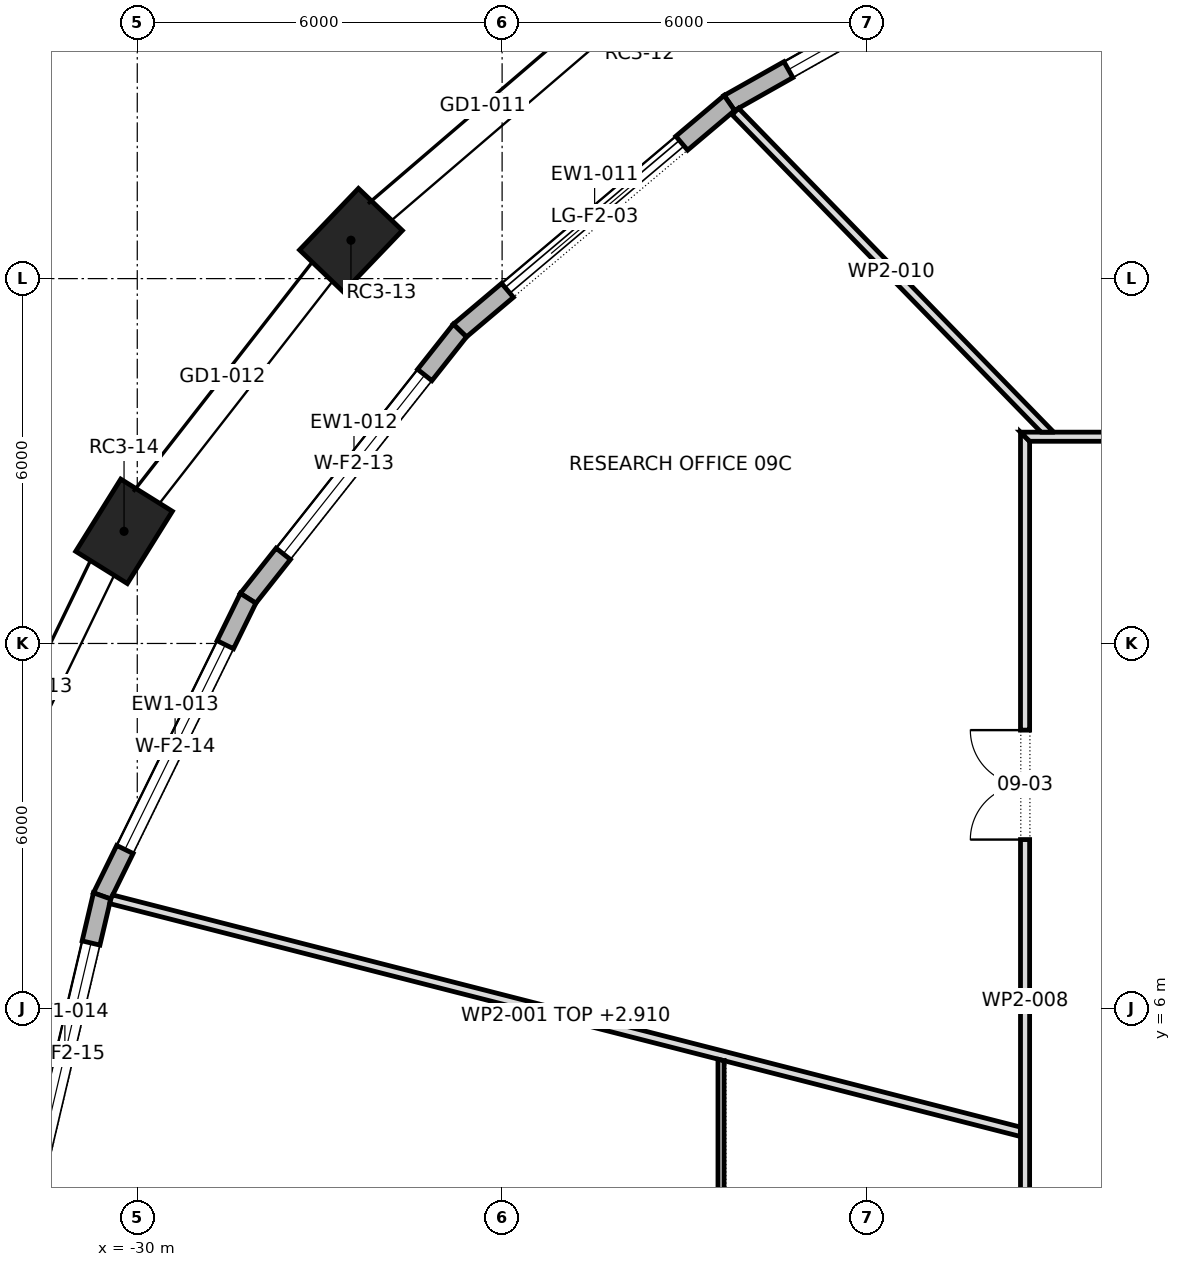
"""IFC4 building model, lengths in metres.
Left out: names, types, materials, properties, quantities, classifications, styles, units other than length and angle.
Written with IfcOpenShell. Run it as: python <this file> out.ifc"""

import sys

from ifc_helpers import new_model, si_unit, direction, frame, frame_2d, origin, origin_2d, place, context, subcontext, project, spatial, polyline, rectangle, outline, extrude, element, fill, save


model = new_model("IFC4")
c1 = context("Model", 3, precision=1e-05, world=origin(), true_north=direction((0.0, 1.0)))
c2 = subcontext(c1, "Body", "Model", "MODEL_VIEW")
j1 = project(units=[si_unit("LENGTHUNIT", "METRE"), si_unit("PLANEANGLEUNIT", "RADIAN")], contexts=[c1])
p1 = place(None, origin())
s1 = spatial("IfcSite", under=j1, at=p1, CompositionType="ELEMENT")
p2 = place(p1, origin())
s2 = spatial("IfcBuilding", under=s1, at=p2, CompositionType="ELEMENT")
p3 = place(p2, frame((0.0, 0.0, 138.1)))
s3 = spatial("IfcBuildingStorey", under=s2, at=p3, CompositionType="ELEMENT", Elevation=138.1)
for number, where, z_axis, x_axis in (
    (1, (-26.486, 18.631, 0.0), (0.0, 0.0, 1.0), (-0.692, -0.722, 0.0)),
    (2, (-30.217, 13.844, 0.0), (0.0, 0.0, 1.0), (-0.529, -0.849, 0.0)),
):
    element("IfcColumn", number, at=place(p3, frame(where, z_axis=z_axis, x_axis=x_axis)), inside=s3, PredefinedType="COLUMN", context=c2, shape_type="SweptSolid", body=[
        extrude(rectangle(XDim=1.4, YDim=1.0, at=origin_2d()), origin(), (0.0, 0.0, 1.0), 4.2),
    ])
p4 = place(p3, frame((-15.055, 23.827, 0.0), z_axis=(0.0, 0.0, 1.0), x_axis=(-0.87090857883, -0.491445060327, 0.0)))
e3 = element("IfcWall", 3, at=p4, inside=s3, PredefinedType="STANDARD", context=c2, shape_type="SweptSolid", body=[
    extrude(outline(polyline([(-0.013, -0.15), (5.994, -0.15), (5.966, 0.15), (0.013, 0.15), (-0.013, -0.15)])), origin(), (0.0, 0.0, 1.0), 3.9),
])
p5 = place(p4, frame((1.115, 0.0, 0.6)))
e4 = element("IfcOpeningElement", 4, at=p5, cuts=e3, PredefinedType="OPENING", context=c2, shape_type="SweptSolid", body=[
    extrude(rectangle(XDim=3.75, YDim=2.85, at=frame_2d((1.875, 1.425))), frame((0.0, 0.162, 0.0), z_axis=(0.0, -1.0, 0.0), x_axis=(1.0, 0.0, 0.0)), (0.0, 0.0, 1.0), 0.324),
])
p6 = place(p3, frame((-20.263, 20.888, 0.0), z_axis=(0.0, 0.0, 1.0), x_axis=(-0.763963973896, -0.645258898884, 0.0)))
e5 = element("IfcWall", 5, at=p6, inside=s3, PredefinedType="STANDARD", context=c2, shape_type="SweptSolid", body=[
    extrude(outline(polyline([(-0.014, -0.15), (5.815, -0.15), (5.785, 0.15), (0.014, 0.15), (-0.014, -0.15)])), origin(), (0.0, 0.0, 1.0), 3.9),
])
p7 = place(p6, frame((1.025, 0.0, 0.0)))
e6 = element("IfcOpeningElement", 6, at=p7, cuts=e5, PredefinedType="OPENING", context=c2, shape_type="SweptSolid", body=[
    extrude(rectangle(XDim=3.75, YDim=3.45, at=frame_2d((1.875, 1.725))), frame((0.0, 0.162, 0.0), z_axis=(0.0, -1.0, 0.0), x_axis=(1.0, 0.0, 0.0)), (0.0, 0.0, 1.0), 0.324),
])
p8 = place(p3, frame((-24.694, 17.146, 0.0), z_axis=(0.0, 0.0, 1.0), x_axis=(-0.620464552431, -0.784234492468, 0.0)))
e7 = element("IfcWall", 7, at=p8, inside=s3, PredefinedType="STANDARD", context=c2, shape_type="SweptSolid", body=[
    extrude(outline(polyline([(-0.015, -0.15), (5.63, -0.15), (5.598, 0.15), (0.015, 0.15), (-0.015, -0.15)])), origin(), (0.0, 0.0, 1.0), 3.9),
])
p9 = place(p8, frame((0.932, 0.0, 0.6)))
e8 = element("IfcOpeningElement", 8, at=p9, cuts=e7, PredefinedType="OPENING", context=c2, shape_type="SweptSolid", body=[
    extrude(rectangle(XDim=3.75, YDim=2.85, at=frame_2d((1.875, 1.425))), frame((0.0, 0.162, 0.0), z_axis=(0.0, -1.0, 0.0), x_axis=(1.0, 0.0, 0.0)), (0.0, 0.0, 1.0), 0.324),
])
p10 = place(p3, frame((-28.177, 12.743, 0.0), z_axis=(0.0, 0.0, 1.0), x_axis=(-0.440321465864, -0.897840189956, 0.0)))
e9 = element("IfcWall", 9, at=p10, inside=s3, PredefinedType="STANDARD", context=c2, shape_type="SweptSolid", body=[
    extrude(outline(polyline([(-0.016, -0.15), (5.468, -0.15), (5.435, 0.15), (0.016, 0.15), (-0.016, -0.15)])), origin(), (0.0, 0.0, 1.0), 3.9),
])
p11 = place(p10, frame((0.851, 0.0, 0.6)))
e10 = element("IfcOpeningElement", 10, at=p11, cuts=e9, PredefinedType="OPENING", context=c2, shape_type="SweptSolid", body=[
    extrude(rectangle(XDim=3.75, YDim=2.85, at=frame_2d((1.875, 1.425))), frame((0.0, 0.162, 0.0), z_axis=(0.0, -1.0, 0.0), x_axis=(1.0, 0.0, 0.0)), (0.0, 0.0, 1.0), 0.324),
])
p12 = place(p3, frame((-30.578, 7.848, 0.0), z_axis=(0.0, 0.0, 1.0), x_axis=(-0.229227895667, -0.973372781543, 0.0)))
e11 = element("IfcWall", 11, at=p12, inside=s3, PredefinedType="STANDARD", context=c2, shape_type="SweptSolid", body=[
    extrude(outline(polyline([(-0.017, -0.15), (5.357, -0.15), (5.323, 0.15), (0.017, 0.15), (-0.017, -0.15)])), origin(), (0.0, 0.0, 1.0), 3.9),
])
p13 = place(p12, frame((0.795, 0.0, 0.6)))
e12 = element("IfcOpeningElement", 12, at=p13, cuts=e11, PredefinedType="OPENING", context=c2, shape_type="SweptSolid", body=[
    extrude(rectangle(XDim=3.75, YDim=2.85, at=frame_2d((1.875, 1.425))), frame((0.0, 0.162, 0.0), z_axis=(0.0, -1.0, 0.0), x_axis=(1.0, 0.0, 0.0)), (0.0, 0.0, 1.0), 0.324),
])
p14 = place(p3, frame((-30.435, 7.795, 0.0), z_axis=(0.0, 0.0, 1.0), x_axis=(0.968826155352, -0.247741560312, 0.0)))
e13 = element("IfcWall", 13, at=p14, inside=s3, PredefinedType="PARTITIONING", context=c2, shape_type="SweptSolid", body=[
    extrude(outline(polyline([(0.0, -0.075), (1.737, -0.075), (3.474, -0.075), (5.211, -0.075), (6.948, -0.075), (8.685, -0.075), (10.422, -0.075), (10.428, -0.073), (10.428, -0.075), (12.106, -0.075), (13.783, -0.075), (15.46, -0.075), (15.46, -0.073), (15.422, 0.075), (13.496, 0.075), (11.57, 0.075), (9.644, 0.075), (7.718, 0.075), (5.792, 0.075), (3.866, 0.075), (1.939, 0.075), (0.013, 0.075), (0.0, 0.01), (0.0, -0.075)])), origin(), (0.0, 0.0, 1.0), 2.91),
])
p15 = place(p3, frame((-20.4, -9.148, 0.0), z_axis=(0.0, 0.0, 1.0), x_axis=(0.0, 1.0, 0.0)))
e14 = element("IfcWall", 14, at=p15, inside=s3, PredefinedType="PARTITIONING", context=c2, shape_type="SweptSolid", body=[
    extrude(outline(polyline([(0.045, -0.05), (2.01, -0.05), (3.974, -0.05), (5.938, -0.05), (5.938, -0.05), (6.038, -0.05), (6.038, -0.05), (7.688, -0.05), (9.338, -0.05), (10.988, -0.05), (12.637, -0.05), (14.287, -0.05), (14.312, 0.049), (14.312, 0.05), (12.523, 0.05), (10.734, 0.05), (8.945, 0.05), (7.156, 0.05), (5.367, 0.05), (3.578, 0.05), (1.789, 0.05), (0.0, 0.05), (0.0, 0.05), (0.045, -0.05)])), origin(), (0.0, 0.0, 1.0), 3.9),
])
p16 = place(p15, frame((9.733, 0.0, 0.0)))
e15 = element("IfcOpeningElement", 15, at=p16, cuts=e14, PredefinedType="OPENING", context=c2, shape_type="SweptSolid", body=[
    extrude(rectangle(XDim=0.9, YDim=2.1, at=frame_2d((0.45, 1.05))), frame((0.0, 0.062, 0.0), z_axis=(0.0, -1.0, 0.0), x_axis=(1.0, 0.0, 0.0)), (0.0, 0.0, 1.0), 0.124),
])
p17 = place(p3, frame((-15.4, -3.16, 0.0), z_axis=(0.0, 0.0, 1.0), x_axis=(0.0, 1.0, 0.0)))
e16 = element("IfcWall", 16, at=p17, inside=s3, PredefinedType="PARTITIONING", context=c2, shape_type="SweptSolid", body=[
    extrude(outline(polyline([(0.0, -0.075), (1.848, -0.075), (3.697, -0.075), (5.545, -0.075), (7.394, -0.075), (9.242, -0.075), (11.091, -0.075), (12.939, -0.075), (14.788, -0.075), (16.636, -0.075), (18.485, -0.075), (18.635, 0.075), (16.771, 0.075), (14.908, 0.075), (13.044, 0.075), (11.181, 0.075), (9.317, 0.075), (7.454, 0.075), (5.59, 0.075), (3.727, 0.075), (1.864, 0.075), (0.0, 0.075), (0.0, -0.075)])), origin(), (0.0, 0.0, 1.0), 3.9),
])
p18 = place(p17, frame((11.935, 0.0, 0.0)))
e17 = element("IfcOpeningElement", 17, at=p18, cuts=e16, PredefinedType="OPENING", context=c2, shape_type="SweptSolid", body=[
    extrude(rectangle(XDim=1.8, YDim=2.1, at=frame_2d((0.9, 1.05))), frame((0.0, 0.087, 0.0), z_axis=(0.0, -1.0, 0.0), x_axis=(1.0, 0.0, 0.0)), (0.0, 0.0, 1.0), 0.174),
])
p19 = place(p17, frame((3.055, 0.0, 0.0)))
e18 = element("IfcOpeningElement", 18, at=p19, cuts=e16, PredefinedType="OPENING", context=c2, shape_type="SweptSolid", body=[
    extrude(rectangle(XDim=1.0, YDim=2.1, at=frame_2d((0.5, 1.05))), frame((0.0, 0.087, 0.0), z_axis=(0.0, -1.0, 0.0), x_axis=(1.0, 0.0, 0.0)), (0.0, 0.0, 1.0), 0.174),
])
p20 = place(p3, frame((-15.475, 15.4, 0.0), z_axis=(0.0, 0.0, 1.0), x_axis=(1.0, 0.0, 0.0)))
e19 = element("IfcWall", 19, at=p20, inside=s3, PredefinedType="PARTITIONING", context=c2, shape_type="SweptSolid", body=[
    extrude(outline(polyline([(0.15, -0.075), (2.066, -0.075), (3.981, -0.075), (5.897, -0.075), (7.812, -0.075), (9.728, -0.075), (11.644, -0.075), (13.56, -0.075), (15.475, -0.075), (17.391, -0.075), (19.306, -0.075), (21.222, -0.075), (23.138, -0.075), (25.053, -0.075), (26.969, -0.075), (28.885, -0.075), (30.8, -0.075), (30.95, 0.075), (29.016, 0.075), (27.081, 0.075), (25.147, 0.075), (23.212, 0.075), (21.278, 0.075), (19.344, 0.075), (17.409, 0.075), (15.475, 0.075), (13.541, 0.075), (11.606, 0.075), (9.672, 0.075), (7.738, 0.075), (5.803, 0.075), (3.869, 0.075), (1.935, 0.075), (0.0, 0.075), (0.15, -0.075)])), origin(), (0.0, 0.0, 1.0), 3.9),
])
p21 = place(p20, frame((22.955, 0.0, 0.0)))
e20 = element("IfcOpeningElement", 20, at=p21, cuts=e19, PredefinedType="OPENING", context=c2, shape_type="SweptSolid", body=[
    extrude(rectangle(XDim=1.8, YDim=2.1, at=frame_2d((0.9, 1.05))), frame((0.0, 0.087, 0.0), z_axis=(0.0, -1.0, 0.0), x_axis=(1.0, 0.0, 0.0)), (0.0, 0.0, 1.0), 0.174),
])
p22 = place(p20, frame((7.995, 0.0, 0.0)))
e21 = element("IfcOpeningElement", 21, at=p22, cuts=e19, PredefinedType="OPENING", context=c2, shape_type="SweptSolid", body=[
    extrude(rectangle(XDim=1.8, YDim=2.1, at=frame_2d((0.9, 1.05))), frame((0.0, 0.087, 0.0), z_axis=(0.0, -1.0, 0.0), x_axis=(1.0, 0.0, 0.0)), (0.0, 0.0, 1.0), 0.174),
])
p23 = place(p3, frame((-14.982, 15.423, 0.0), z_axis=(0.0, 0.0, 1.0), x_axis=(-0.69739829169, 0.716683767604, 0.0)))
e22 = element("IfcWall", 22, at=p23, inside=s3, PredefinedType="PARTITIONING", context=c2, shape_type="SweptSolid", body=[
    extrude(outline(polyline([(7.431, 0.075), (5.61, 0.075), (3.788, 0.075), (1.967, 0.075), (0.146, 0.075), (0.0, -0.075), (0.0, -0.075), (1.858, -0.075), (3.715, -0.075), (5.573, -0.075), (7.431, -0.075), (7.431, 0.075)])), origin(), (0.0, 0.0, 1.0), 3.9),
])
p24 = place(p5, origin())
e23 = element("IfcWindow", 23, at=p24, inside=s3, PartitioningType="TRIPLE_PANEL_VERTICAL", PredefinedType="WINDOW", context=c2, shape_type="SweptSolid", body=[
    extrude(rectangle(XDim=3.75, YDim=2.85, at=frame_2d((1.875, 1.425))), frame((0.0, 0.03, 0.0), z_axis=(0.0, -1.0, 0.0), x_axis=(1.0, 0.0, 0.0)), (0.0, 0.0, 1.0), 0.06),
])
fill(e4, e23)
p25 = place(p7, origin())
e24 = element("IfcDoor", 24, at=p25, inside=s3, OperationType="DOUBLE_DOOR_SLIDING", PredefinedType="DOOR", context=c2, shape_type="SweptSolid", body=[
    extrude(rectangle(XDim=3.75, YDim=3.45, at=frame_2d((1.875, 1.725))), frame((0.0, 0.025, 0.0), z_axis=(0.0, -1.0, 0.0), x_axis=(1.0, 0.0, 0.0)), (0.0, 0.0, 1.0), 0.05),
])
fill(e6, e24)
p26 = place(p9, origin())
e25 = element("IfcWindow", 25, at=p26, inside=s3, PartitioningType="TRIPLE_PANEL_VERTICAL", PredefinedType="WINDOW", context=c2, shape_type="SweptSolid", body=[
    extrude(rectangle(XDim=3.75, YDim=2.85, at=frame_2d((1.875, 1.425))), frame((0.0, 0.03, 0.0), z_axis=(0.0, -1.0, 0.0), x_axis=(1.0, 0.0, 0.0)), (0.0, 0.0, 1.0), 0.06),
])
fill(e8, e25)
p27 = place(p11, origin())
e26 = element("IfcWindow", 26, at=p27, inside=s3, PartitioningType="TRIPLE_PANEL_VERTICAL", PredefinedType="WINDOW", context=c2, shape_type="SweptSolid", body=[
    extrude(rectangle(XDim=3.75, YDim=2.85, at=frame_2d((1.875, 1.425))), frame((0.0, 0.03, 0.0), z_axis=(0.0, -1.0, 0.0), x_axis=(1.0, 0.0, 0.0)), (0.0, 0.0, 1.0), 0.06),
])
fill(e10, e26)
p28 = place(p13, origin())
e27 = element("IfcWindow", 27, at=p28, inside=s3, PartitioningType="TRIPLE_PANEL_VERTICAL", PredefinedType="WINDOW", context=c2, shape_type="SweptSolid", body=[
    extrude(rectangle(XDim=3.75, YDim=2.85, at=frame_2d((1.875, 1.425))), frame((0.0, 0.03, 0.0), z_axis=(0.0, -1.0, 0.0), x_axis=(1.0, 0.0, 0.0)), (0.0, 0.0, 1.0), 0.06),
])
fill(e12, e27)
p29 = place(p18, origin())
e28 = element("IfcDoor", 28, at=p29, inside=s3, OperationType="DOUBLE_DOOR_SINGLE_SWING", PredefinedType="DOOR", context=c2, shape_type="SweptSolid", body=[
    extrude(rectangle(XDim=1.8, YDim=2.1, at=frame_2d((0.9, 1.05))), frame((0.0, 0.025, 0.0), z_axis=(0.0, -1.0, 0.0), x_axis=(1.0, 0.0, 0.0)), (0.0, 0.0, 1.0), 0.05),
])
fill(e17, e28)
save(model, sys.argv[1])
